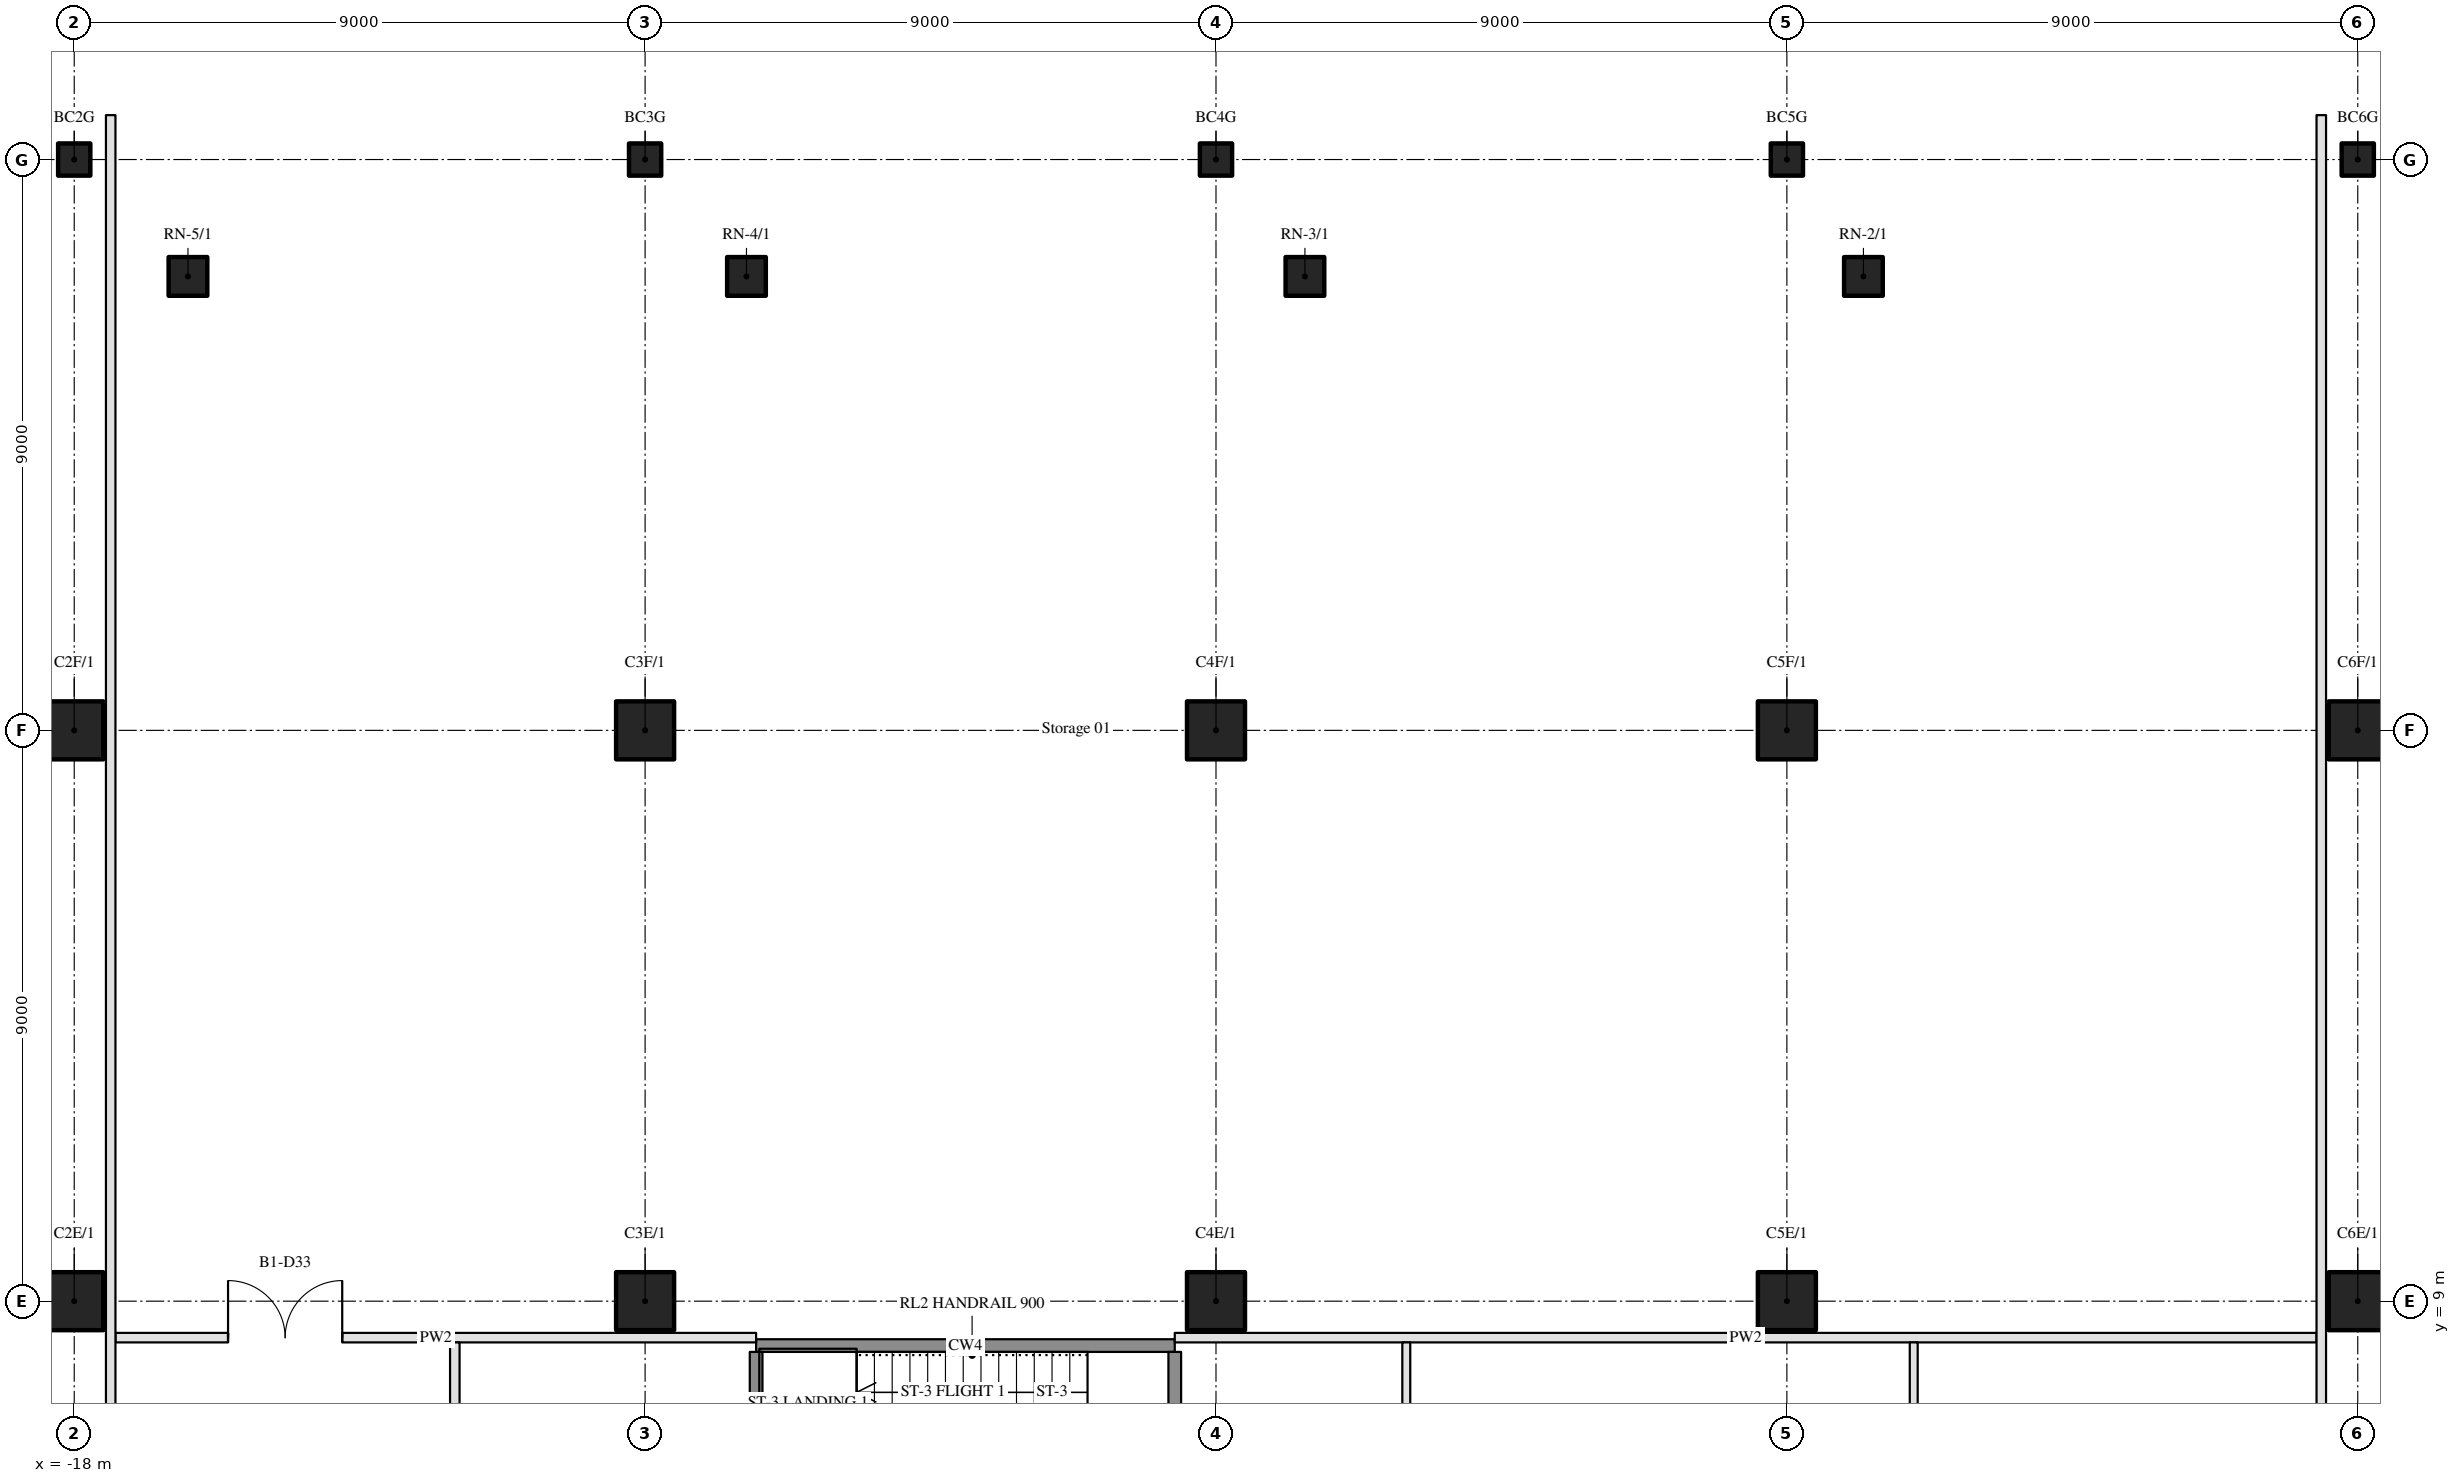
"""IFC4 building model, lengths in metres.
Left out: names, types, materials, properties, quantities, classifications, styles, units other than length and angle.
Written with IfcOpenShell. Run it as: python <this file> out.ifc"""

import sys

from ifc_helpers import new_model, si_unit, direction, frame, frame_2d, origin, origin_2d, place, context, subcontext, project, spatial, rectangle, hollow_circle, extrude, element, fill, save


model = new_model("IFC4")
c1 = context("Model", 3, precision=1e-05, world=origin(), true_north=direction((0.0, 1.0)))
c2 = subcontext(c1, "Body", "Model", "MODEL_VIEW")
j1 = project(units=[si_unit("LENGTHUNIT", "METRE"), si_unit("PLANEANGLEUNIT", "RADIAN")], contexts=[c1])
p1 = place(None, origin())
s1 = spatial("IfcSite", under=j1, at=p1, CompositionType="ELEMENT")
p2 = place(p1, origin())
s2 = spatial("IfcBuilding", under=s1, at=p2, CompositionType="ELEMENT")
p3 = place(p2, frame((0.0, 0.0, -5.0)))
s3 = spatial("IfcBuildingStorey", under=s2, at=p3, CompositionType="ELEMENT", Elevation=-5.0)
for number, where, z_axis, x_axis in (
    (1, (-18.0, 9.0, -0.25), (0.0, 0.0, 1.0), (1.0, 0.0, 0.0)),
    (2, (-18.0, 18.0, -0.25), (0.0, 0.0, 1.0), (1.0, 0.0, 0.0)),
    (3, (-9.0, 9.0, -0.25), (0.0, 0.0, 1.0), (1.0, 0.0, 0.0)),
    (4, (-9.0, 18.0, -0.25), (0.0, 0.0, 1.0), (1.0, 0.0, 0.0)),
    (5, (0.0, 9.0, -0.25), (0.0, 0.0, 1.0), (1.0, 0.0, 0.0)),
    (6, (0.0, 18.0, -0.25), (0.0, 0.0, 1.0), (1.0, 0.0, 0.0)),
    (7, (9.0, 9.0, -0.25), (0.0, 0.0, 1.0), (1.0, 0.0, 0.0)),
    (8, (9.0, 18.0, -0.25), (0.0, 0.0, 1.0), (1.0, 0.0, 0.0)),
    (9, (18.0, 9.0, -0.25), (0.0, 0.0, 1.0), (1.0, 0.0, 0.0)),
    (10, (18.0, 18.0, -0.25), (0.0, 0.0, 1.0), (1.0, 0.0, 0.0)),
):
    element("IfcColumn", number, at=place(p3, frame(where, z_axis=z_axis, x_axis=x_axis)), inside=s3, PredefinedType="COLUMN", context=c2, shape_type="SweptSolid", body=[
        extrude(hollow_circle(Radius=0.457, WallThickness=0.05, at=origin_2d()), origin(), (0.0, 0.0, 1.0), 5.25),
    ])
for number, where, z_axis, x_axis in (
    (11, (10.207, 25.157, -0.25), (0.0, 0.0, 1.0), (1.0, 0.0, 0.0)),
    (12, (1.402, 25.157, -0.25), (0.0, 0.0, 1.0), (1.0, 0.0, 0.0)),
    (13, (-7.402, 25.157, -0.25), (0.0, 0.0, 1.0), (1.0, 0.0, 0.0)),
    (14, (-16.207, 25.157, -0.25), (0.0, 0.0, 1.0), (1.0, 0.0, 0.0)),
):
    element("IfcColumn", number, at=place(p3, frame(where, z_axis=z_axis, x_axis=x_axis)), inside=s3, PredefinedType="COLUMN", context=c2, shape_type="SweptSolid", body=[
        extrude(hollow_circle(Radius=0.305, WallThickness=0.03, at=origin_2d()), origin(), (0.0, 0.0, 1.0), 5.25),
    ])
for number, where, z_axis, x_axis in (
    (15, (-18.0, 27.0, -0.25), (0.0, 0.0, 1.0), (1.0, 0.0, 0.0)),
    (16, (-9.0, 27.0, -0.25), (0.0, 0.0, 1.0), (1.0, 0.0, 0.0)),
    (17, (0.0, 27.0, -0.25), (0.0, 0.0, 1.0), (1.0, 0.0, 0.0)),
    (18, (9.0, 27.0, -0.25), (0.0, 0.0, 1.0), (1.0, 0.0, 0.0)),
    (19, (18.0, 27.0, -0.25), (0.0, 0.0, 1.0), (1.0, 0.0, 0.0)),
):
    element("IfcColumn", number, at=place(p3, frame(where, z_axis=z_axis, x_axis=x_axis)), inside=s3, PredefinedType="COLUMN", context=c2, shape_type="SweptSolid", body=[
        extrude(hollow_circle(Radius=0.254, WallThickness=0.03, at=origin_2d()), origin(), (0.0, 0.0, 1.0), 4.8),
    ])
p4 = place(p3, frame((-7.25, 8.3, 0.0), z_axis=(0.0, 0.0, 1.0), x_axis=(1.0, 0.0, 0.0)))
e20 = element("IfcWall", 20, at=p4, inside=s3, PredefinedType="SHEAR", context=c2, shape_type="SweptSolid", body=[
    extrude(rectangle(XDim=6.6, YDim=0.2, at=frame_2d((3.3, 0.0))), origin(), (0.0, 0.0, 1.0), 5.0),
])
p5 = place(p3, frame((-17.35, 8.425, 0.0), z_axis=(0.0, 0.0, 1.0), x_axis=(1.0, 0.0, 0.0)))
e21 = element("IfcWall", 21, at=p5, inside=s3, PredefinedType="PARTITIONING", context=c2, shape_type="SweptSolid", body=[
    extrude(rectangle(XDim=10.1, YDim=0.15, at=frame_2d((5.05, 0.0))), origin(), (0.0, 0.0, 1.0), 4.06),
])
p6 = place(p5, frame((1.775, 0.0, 0.0)))
e22 = element("IfcOpeningElement", 22, at=p6, cuts=e21, PredefinedType="OPENING", context=c2, shape_type="SweptSolid", body=[
    extrude(rectangle(XDim=1.8, YDim=2.1, at=frame_2d((0.9, 1.05))), frame((0.0, 0.085, 0.0), z_axis=(0.0, -1.0, 0.0), x_axis=(1.0, 0.0, 0.0)), (0.0, 0.0, 1.0), 0.17),
])
p7 = place(p3, frame((-0.65, 8.425, 0.0), z_axis=(0.0, 0.0, 1.0), x_axis=(1.0, 0.0, 0.0)))
e23 = element("IfcWall", 23, at=p7, inside=s3, PredefinedType="PARTITIONING", context=c2, shape_type="SweptSolid", body=[
    extrude(rectangle(XDim=18.0, YDim=0.15, at=frame_2d((9.0, 0.0))), origin(), (0.0, 0.0, 1.0), 4.06),
])
p8 = place(p3, frame((-17.425, 27.7, 0.0), z_axis=(0.0, 0.0, 1.0), x_axis=(0.0, -1.0, 0.0)))
e24 = element("IfcWall", 24, at=p8, inside=s3, PredefinedType="PARTITIONING", context=c2, shape_type="SweptSolid", body=[
    extrude(rectangle(XDim=55.4, YDim=0.15, at=frame_2d((27.7, 0.0))), origin(), (0.0, 0.0, 1.0), 4.06),
])
p9 = place(p8, frame((38.8, 0.0, 0.0)))
e25 = element("IfcOpeningElement", 25, at=p9, cuts=e24, PredefinedType="OPENING", context=c2, shape_type="SweptSolid", body=[
    extrude(rectangle(XDim=1.8, YDim=2.1, at=frame_2d((0.9, 1.05))), frame((0.0, 0.085, 0.0), z_axis=(0.0, -1.0, 0.0), x_axis=(1.0, 0.0, 0.0)), (0.0, 0.0, 1.0), 0.17),
])
p10 = place(p8, frame((28.3, 0.0, 0.0)))
e26 = element("IfcOpeningElement", 26, at=p10, cuts=e24, PredefinedType="OPENING", context=c2, shape_type="SweptSolid", body=[
    extrude(rectangle(XDim=1.8, YDim=2.1, at=frame_2d((0.9, 1.05))), frame((0.0, 0.085, 0.0), z_axis=(0.0, -1.0, 0.0), x_axis=(1.0, 0.0, 0.0)), (0.0, 0.0, 1.0), 0.17),
])
p11 = place(p8, frame((30.4, 0.0, 0.0)))
e27 = element("IfcOpeningElement", 27, at=p11, cuts=e24, PredefinedType="OPENING", context=c2, shape_type="SweptSolid", body=[
    extrude(rectangle(XDim=1.8, YDim=2.1, at=frame_2d((0.9, 1.05))), frame((0.0, 0.085, 0.0), z_axis=(0.0, -1.0, 0.0), x_axis=(1.0, 0.0, 0.0)), (0.0, 0.0, 1.0), 0.17),
])
p12 = place(p3, frame((-12.0, 6.075, 0.0), z_axis=(0.0, 0.0, 1.0), x_axis=(0.0, 1.0, 0.0)))
e28 = element("IfcWall", 28, at=p12, inside=s3, PredefinedType="PARTITIONING", context=c2, shape_type="SweptSolid", body=[
    extrude(rectangle(XDim=2.275, YDim=0.15, at=frame_2d((1.138, 0.0))), origin(), (0.0, 0.0, 1.0), 4.06),
])
for number, where, z_axis, x_axis in (
    (29, (-7.25, 5.5, 0.0), (0.0, 0.0, 1.0), (0.0, 1.0, 0.0)),
    (30, (-0.65, 5.5, 0.0), (0.0, 0.0, 1.0), (0.0, 1.0, 0.0)),
):
    element("IfcWall", number, at=place(p3, frame(where, z_axis=z_axis, x_axis=x_axis)), inside=s3, PredefinedType="SHEAR", context=c2, shape_type="SweptSolid", body=[
        extrude(rectangle(XDim=2.7, YDim=0.2, at=frame_2d((1.35, 0.0))), origin(), (0.0, 0.0, 1.0), 5.0),
    ])
for number, where, z_axis, x_axis in (
    (31, (3.0, 6.075, 0.0), (0.0, 0.0, 1.0), (0.0, 1.0, 0.0)),
    (32, (11.0, 6.075, 0.0), (0.0, 0.0, 1.0), (0.0, 1.0, 0.0)),
):
    element("IfcWall", number, at=place(p3, frame(where, z_axis=z_axis, x_axis=x_axis)), inside=s3, PredefinedType="PARTITIONING", context=c2, shape_type="SweptSolid", body=[
        extrude(rectangle(XDim=2.275, YDim=0.125, at=frame_2d((1.138, 0.0))), origin(), (0.0, 0.0, 1.0), 4.06),
    ])
p13 = place(p3, frame((17.425, -27.7, 0.0), z_axis=(0.0, 0.0, 1.0), x_axis=(0.0, 1.0, 0.0)))
e33 = element("IfcWall", 33, at=p13, inside=s3, PredefinedType="PARTITIONING", context=c2, shape_type="SweptSolid", body=[
    extrude(rectangle(XDim=55.4, YDim=0.15, at=frame_2d((27.7, 0.0))), origin(), (0.0, 0.0, 1.0), 4.06),
])
p14 = place(p13, frame((19.3, 0.0, 0.0)))
e34 = element("IfcOpeningElement", 34, at=p14, cuts=e33, PredefinedType="OPENING", context=c2, shape_type="SweptSolid", body=[
    extrude(rectangle(XDim=1.8, YDim=2.1, at=frame_2d((0.9, 1.05))), frame((0.0, 0.085, 0.0), z_axis=(0.0, -1.0, 0.0), x_axis=(1.0, 0.0, 0.0)), (0.0, 0.0, 1.0), 0.17),
])
p15 = place(p13, frame((21.4, 0.0, 0.0)))
e35 = element("IfcOpeningElement", 35, at=p15, cuts=e33, PredefinedType="OPENING", context=c2, shape_type="SweptSolid", body=[
    extrude(rectangle(XDim=1.8, YDim=2.1, at=frame_2d((0.9, 1.05))), frame((0.0, 0.085, 0.0), z_axis=(0.0, -1.0, 0.0), x_axis=(1.0, 0.0, 0.0)), (0.0, 0.0, 1.0), 0.17),
])
p16 = place(p13, frame((29.8, 0.0, 0.0)))
e36 = element("IfcOpeningElement", 36, at=p16, cuts=e33, PredefinedType="OPENING", context=c2, shape_type="SweptSolid", body=[
    extrude(rectangle(XDim=1.8, YDim=2.1, at=frame_2d((0.9, 1.05))), frame((0.0, 0.085, 0.0), z_axis=(0.0, -1.0, 0.0), x_axis=(1.0, 0.0, 0.0)), (0.0, 0.0, 1.0), 0.17),
])
p17 = place(p6, origin())
e37 = element("IfcDoor", 37, at=p17, inside=s3, OperationType="DOUBLE_DOOR_SINGLE_SWING", PredefinedType="DOOR", context=c2, shape_type="SweptSolid", body=[
    extrude(rectangle(XDim=1.8, YDim=2.1, at=frame_2d((0.9, 1.05))), frame((0.0, 0.025, 0.0), z_axis=(0.0, -1.0, 0.0), x_axis=(1.0, 0.0, 0.0)), (0.0, 0.0, 1.0), 0.05),
])
fill(e22, e37)
save(model, sys.argv[1])
